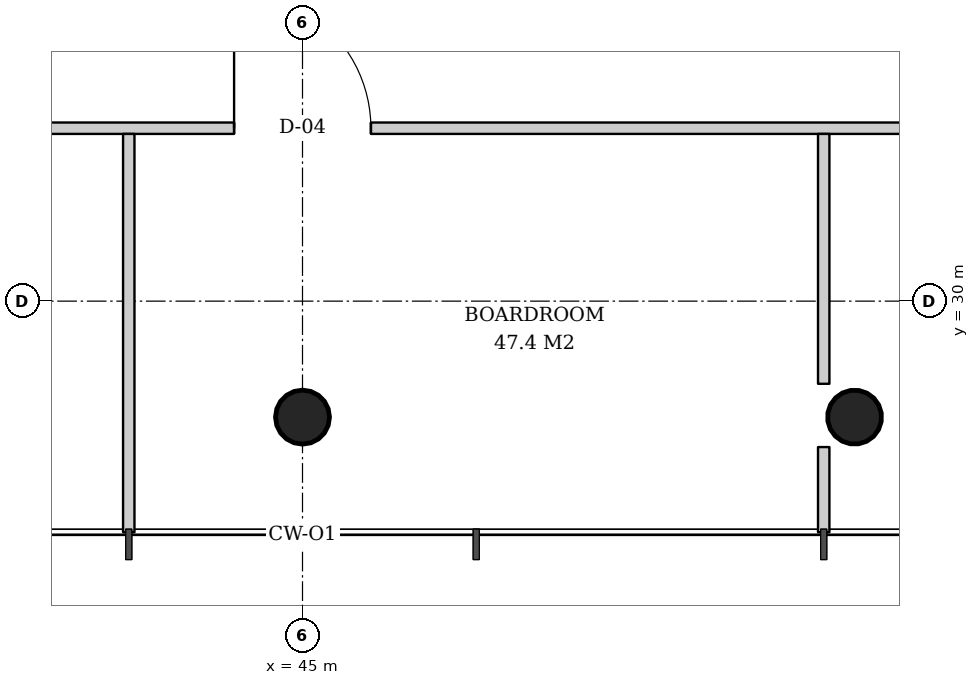
"""IFC4 building model, lengths in metres.
Left out: names, types, materials, properties, quantities, classifications, styles, units other than length and angle.
Written with IfcOpenShell. Run it as: python <this file> out.ifc"""

import sys

from ifc_helpers import new_model, si_unit, direction, frame, frame_2d, origin, origin_2d, place, context, subcontext, project, spatial, rectangle, hollow_circle, extrude, element, fill, save


model = new_model("IFC4")
c1 = context("Model", 3, precision=1e-05, world=origin(), true_north=direction((0.0, 1.0)))
c2 = subcontext(c1, "Body", "Model", "MODEL_VIEW")
j1 = project(units=[si_unit("LENGTHUNIT", "METRE"), si_unit("PLANEANGLEUNIT", "RADIAN")], contexts=[c1])
p1 = place(None, origin())
s1 = spatial("IfcSite", under=j1, at=p1, CompositionType="ELEMENT")
p2 = place(p1, origin())
s2 = spatial("IfcBuilding", under=s1, at=p2, CompositionType="ELEMENT")
p3 = place(p2, frame((0.0, 0.0, 222.4)))
s3 = spatial("IfcBuildingStorey", under=s2, at=p3, CompositionType="ELEMENT", Elevation=222.4)
p4 = place(p3, frame((45.0, 28.436, 0.0), z_axis=(0.0, 0.031914348339, 0.999490607445), x_axis=(-1.0, 0.0, 0.0)))
e1 = element("IfcColumn", 1, at=p4, inside=s3, PredefinedType="COLUMN", context=c2, shape_type="SweptSolid", body=[
    extrude(hollow_circle(Radius=0.355, WallThickness=0.025, at=origin_2d()), origin(), (0.0, 0.0, 1.0), 3.802),
])
p5 = place(p3, frame((52.282, 28.436, 0.0), z_axis=(-0.015987237665, 0.031910269556, 0.999362868496), x_axis=(-0.894067115991, -0.447933021895, 0.0)))
e2 = element("IfcColumn", 2, at=p5, inside=s3, PredefinedType="COLUMN", context=c2, shape_type="SweptSolid", body=[
    extrude(hollow_circle(Radius=0.355, WallThickness=0.025, at=origin_2d()), origin(), (0.0, 0.0, 1.0), 3.802),
])
p6 = place(p3, frame((32.764, 32.275, 0.0), z_axis=(0.0, 0.0, 1.0), x_axis=(1.0, 0.0, 0.0)))
e3 = element("IfcWall", 3, at=p6, inside=s3, PredefinedType="PARTITIONING", context=c2, shape_type="SweptSolid", body=[
    extrude(rectangle(XDim=24.472, YDim=0.15, at=frame_2d((12.236, 0.0))), origin(), (0.0, 0.0, 1.0), 2.706),
])
p7 = place(p6, frame((2.593, 0.0, 0.0)))
e4 = element("IfcOpeningElement", 4, at=p7, cuts=e3, PredefinedType="OPENING", context=c2, shape_type="SweptSolid", body=[
    extrude(rectangle(XDim=1.0, YDim=2.1, at=frame_2d((0.5, 1.05))), frame((0.0, 0.085, 0.0), z_axis=(0.0, -1.0, 0.0), x_axis=(1.0, 0.0, 0.0)), (0.0, 0.0, 1.0), 0.17),
])
p8 = place(p6, frame((7.164, 0.0, 0.0)))
e5 = element("IfcOpeningElement", 5, at=p8, cuts=e3, PredefinedType="OPENING", context=c2, shape_type="SweptSolid", body=[
    extrude(rectangle(XDim=1.0, YDim=2.1, at=frame_2d((0.5, 1.05))), frame((0.0, 0.085, 0.0), z_axis=(0.0, -1.0, 0.0), x_axis=(1.0, 0.0, 0.0)), (0.0, 0.0, 1.0), 0.17),
])
p9 = place(p6, frame((11.336, 0.0, 0.0)))
e6 = element("IfcOpeningElement", 6, at=p9, cuts=e3, PredefinedType="OPENING", context=c2, shape_type="SweptSolid", body=[
    extrude(rectangle(XDim=1.8, YDim=2.4, at=frame_2d((0.9, 1.2))), frame((0.0, 0.085, 0.0), z_axis=(0.0, -1.0, 0.0), x_axis=(1.0, 0.0, 0.0)), (0.0, 0.0, 1.0), 0.17),
])
p10 = place(p6, frame((20.879, 0.0, 0.0)))
e7 = element("IfcOpeningElement", 7, at=p10, cuts=e3, PredefinedType="OPENING", context=c2, shape_type="SweptSolid", body=[
    extrude(rectangle(XDim=1.0, YDim=2.1, at=frame_2d((0.5, 1.05))), frame((0.0, 0.085, 0.0), z_axis=(0.0, -1.0, 0.0), x_axis=(1.0, 0.0, 0.0)), (0.0, 0.0, 1.0), 0.17),
])
p11 = place(p3, frame((42.714, 32.2, 0.0), z_axis=(0.0, 0.0, 1.0), x_axis=(0.0, -1.0, 0.0)))
e8 = element("IfcWall", 8, at=p11, inside=s3, PredefinedType="PARTITIONING", context=c2, shape_type="SweptSolid", body=[
    extrude(rectangle(XDim=5.24, YDim=0.15, at=frame_2d((2.62, 0.0))), origin(), (0.0, 0.0, 1.0), 3.52),
])
p12 = place(p3, frame((51.857, 32.2, 0.0), z_axis=(0.0, 0.0, 1.0), x_axis=(0.0, -1.0, 0.0)))
e9 = element("IfcWall", 9, at=p12, inside=s3, PredefinedType="PARTITIONING", context=c2, shape_type="SweptSolid", body=[
    extrude(rectangle(XDim=3.287, YDim=0.15, at=frame_2d((1.644, 0.0))), origin(), (0.0, 0.0, 1.0), 3.52),
])
p13 = place(p3, frame((51.857, 28.08, 0.0), z_axis=(0.0, 0.0, 1.0), x_axis=(0.0, -1.0, 0.0)))
e10 = element("IfcWall", 10, at=p13, inside=s3, PredefinedType="PARTITIONING", context=c2, shape_type="SweptSolid", body=[
    extrude(rectangle(XDim=1.12, YDim=0.15, at=frame_2d((0.56, 0.0))), origin(), (0.0, 0.0, 1.0), 3.52),
])
p14 = place(p9, origin())
e11 = element("IfcDoor", 11, at=p14, inside=s3, OperationType="DOUBLE_DOOR_SINGLE_SWING", PredefinedType="DOOR", context=c2, shape_type="SweptSolid", body=[
    extrude(rectangle(XDim=1.8, YDim=2.4, at=frame_2d((0.9, 1.2))), frame((0.0, 0.025, 0.0), z_axis=(0.0, -1.0, 0.0), x_axis=(1.0, 0.0, 0.0)), (0.0, 0.0, 1.0), 0.05),
])
fill(e6, e11)
save(model, sys.argv[1])
